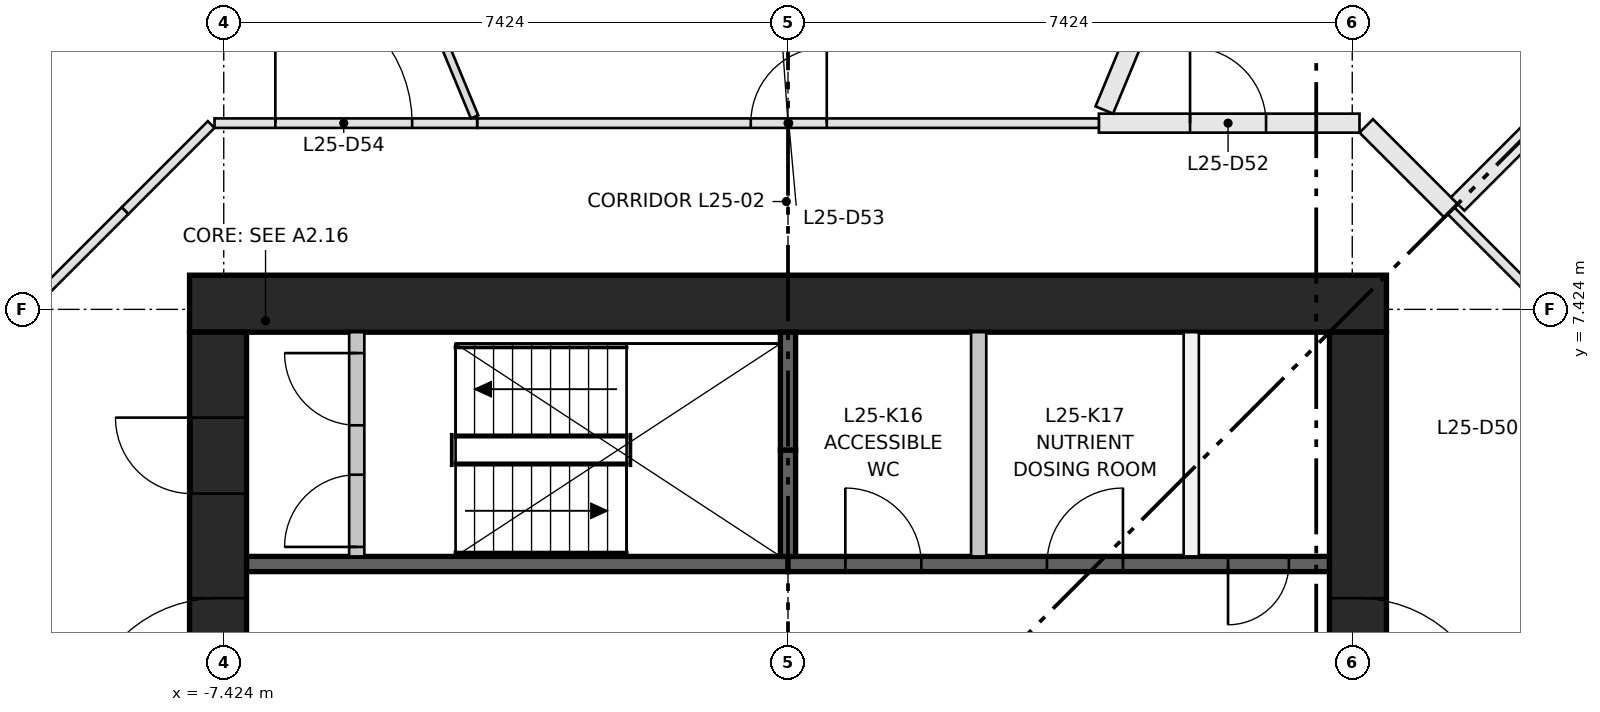
"""IFC4 building model, lengths in metres.
Left out: names, types, materials, properties, quantities, classifications, styles, units other than length and angle.
Written with IfcOpenShell. Run it as: python <this file> out.ifc"""

import sys

from ifc_helpers import new_model, si_unit, direction, frame, frame_2d, origin, place, context, subcontext, project, spatial, rectangle, extrude, element, fill, save


model = new_model("IFC4")
c1 = context("Model", 3, precision=1e-05, world=origin(), true_north=direction((0.0, 1.0)))
c2 = subcontext(c1, "Body", "Model", "MODEL_VIEW")
j1 = project(units=[si_unit("LENGTHUNIT", "METRE"), si_unit("PLANEANGLEUNIT", "RADIAN")], contexts=[c1])
p1 = place(None, origin())
s1 = spatial("IfcSite", under=j1, at=p1, CompositionType="ELEMENT")
p2 = place(p1, origin())
s2 = spatial("IfcBuilding", under=s1, at=p2, CompositionType="ELEMENT")
p3 = place(p2, frame((0.0, 0.0, 98.3)))
s3 = spatial("IfcBuildingStorey", under=s2, at=p3, CompositionType="ELEMENT", Elevation=98.3)
p4 = place(p3, frame((-7.874, 7.499, 0.0), z_axis=(0.0, 0.0, 1.0), x_axis=(1.0, 0.0, 0.0)))
e1 = element("IfcWall", 1, at=p4, inside=s3, PredefinedType="SHEAR", context=c2, shape_type="SweptSolid", body=[
    extrude(rectangle(XDim=15.748, YDim=0.75, at=frame_2d((7.874, 0.0))), origin(), (0.0, 0.0, 1.0), 3.65),
])
p5 = place(p3, frame((-7.499, -7.124, 0.0), z_axis=(0.0, 0.0, 1.0), x_axis=(0.0, 1.0, 0.0)))
e2 = element("IfcWall", 2, at=p5, inside=s3, PredefinedType="SHEAR", context=c2, shape_type="SweptSolid", body=[
    extrude(rectangle(XDim=14.248, YDim=0.75, at=frame_2d((7.124, 0.0))), origin(), (0.0, 0.0, 1.0), 3.65),
])
p6 = place(p5, frame((6.624, 0.0, 0.0)))
e3 = element("IfcOpeningElement", 3, at=p6, cuts=e2, PredefinedType="OPENING", context=c2, shape_type="SweptSolid", body=[
    extrude(rectangle(XDim=1.0, YDim=2.1, at=frame_2d((0.5, 1.05))), frame((0.0, 0.385, 0.0), z_axis=(0.0, -1.0, 0.0), x_axis=(1.0, 0.0, 0.0)), (0.0, 0.0, 1.0), 0.77),
])
p7 = place(p5, frame((3.5, 0.0, 0.0)))
e4 = element("IfcOpeningElement", 4, at=p7, cuts=e2, PredefinedType="OPENING", context=c2, shape_type="SweptSolid", body=[
    extrude(rectangle(XDim=1.8, YDim=2.1, at=frame_2d((0.9, 1.05))), frame((0.0, 0.385, 0.0), z_axis=(0.0, -1.0, 0.0), x_axis=(1.0, 0.0, 0.0)), (0.0, 0.0, 1.0), 0.77),
])
p8 = place(p5, frame((8.948, 0.0, 0.0)))
e5 = element("IfcOpeningElement", 5, at=p8, cuts=e2, PredefinedType="OPENING", context=c2, shape_type="SweptSolid", body=[
    extrude(rectangle(XDim=1.8, YDim=2.1, at=frame_2d((0.9, 1.05))), frame((0.0, 0.385, 0.0), z_axis=(0.0, -1.0, 0.0), x_axis=(1.0, 0.0, 0.0)), (0.0, 0.0, 1.0), 0.77),
])
p9 = place(p5, frame((12.124, 0.0, 0.0)))
e6 = element("IfcOpeningElement", 6, at=p9, cuts=e2, PredefinedType="OPENING", context=c2, shape_type="SweptSolid", body=[
    extrude(rectangle(XDim=1.0, YDim=2.1, at=frame_2d((0.5, 1.05))), frame((0.0, 0.385, 0.0), z_axis=(0.0, -1.0, 0.0), x_axis=(1.0, 0.0, 0.0)), (0.0, 0.0, 1.0), 0.77),
])
p10 = place(p3, frame((7.499, -7.124, 0.0), z_axis=(0.0, 0.0, 1.0), x_axis=(0.0, 1.0, 0.0)))
e7 = element("IfcWall", 7, at=p10, inside=s3, PredefinedType="SHEAR", context=c2, shape_type="SweptSolid", body=[
    extrude(rectangle(XDim=14.248, YDim=0.75, at=frame_2d((7.124, 0.0))), origin(), (0.0, 0.0, 1.0), 3.65),
])
p11 = place(p10, frame((6.624, 0.0, 0.0)))
e8 = element("IfcOpeningElement", 8, at=p11, cuts=e7, PredefinedType="OPENING", context=c2, shape_type="SweptSolid", body=[
    extrude(rectangle(XDim=1.0, YDim=2.1, at=frame_2d((0.5, 1.05))), frame((0.0, 0.385, 0.0), z_axis=(0.0, -1.0, 0.0), x_axis=(1.0, 0.0, 0.0)), (0.0, 0.0, 1.0), 0.77),
])
p12 = place(p10, frame((3.5, 0.0, 0.0)))
e9 = element("IfcOpeningElement", 9, at=p12, cuts=e7, PredefinedType="OPENING", context=c2, shape_type="SweptSolid", body=[
    extrude(rectangle(XDim=1.8, YDim=2.1, at=frame_2d((0.9, 1.05))), frame((0.0, 0.385, 0.0), z_axis=(0.0, -1.0, 0.0), x_axis=(1.0, 0.0, 0.0)), (0.0, 0.0, 1.0), 0.77),
])
p13 = place(p10, frame((8.948, 0.0, 0.0)))
e10 = element("IfcOpeningElement", 10, at=p13, cuts=e7, PredefinedType="OPENING", context=c2, shape_type="SweptSolid", body=[
    extrude(rectangle(XDim=1.8, YDim=2.1, at=frame_2d((0.9, 1.05))), frame((0.0, 0.385, 0.0), z_axis=(0.0, -1.0, 0.0), x_axis=(1.0, 0.0, 0.0)), (0.0, 0.0, 1.0), 0.77),
])
p14 = place(p3, frame((-7.124, 4.074, 0.0), z_axis=(0.0, 0.0, 1.0), x_axis=(1.0, 0.0, 0.0)))
e11 = element("IfcWall", 11, at=p14, inside=s3, PredefinedType="SHEAR", context=c2, shape_type="SweptSolid", body=[
    extrude(rectangle(XDim=7.124, YDim=0.2, at=frame_2d((3.562, 0.0))), origin(), (0.0, 0.0, 1.0), 3.3),
])
p15 = place(p3, frame((0.0, 4.074, 0.0), z_axis=(0.0, 0.0, 1.0), x_axis=(1.0, 0.0, 0.0)))
e12 = element("IfcWall", 12, at=p15, inside=s3, PredefinedType="SHEAR", context=c2, shape_type="SweptSolid", body=[
    extrude(rectangle(XDim=7.124, YDim=0.2, at=frame_2d((3.562, 0.0))), origin(), (0.0, 0.0, 1.0), 3.3),
])
p16 = place(p15, frame((0.754, 0.0, 0.0)))
e13 = element("IfcOpeningElement", 13, at=p16, cuts=e12, PredefinedType="OPENING", context=c2, shape_type="SweptSolid", body=[
    extrude(rectangle(XDim=1.0, YDim=2.1, at=frame_2d((0.5, 1.05))), frame((0.0, 0.11, 0.0), z_axis=(0.0, -1.0, 0.0), x_axis=(1.0, 0.0, 0.0)), (0.0, 0.0, 1.0), 0.22),
])
p17 = place(p15, frame((3.407, 0.0, 0.0)))
e14 = element("IfcOpeningElement", 14, at=p17, cuts=e12, PredefinedType="OPENING", context=c2, shape_type="SweptSolid", body=[
    extrude(rectangle(XDim=1.0, YDim=2.1, at=frame_2d((0.5, 1.05))), frame((0.0, 0.11, 0.0), z_axis=(0.0, -1.0, 0.0), x_axis=(1.0, 0.0, 0.0)), (0.0, 0.0, 1.0), 0.22),
])
p18 = place(p15, frame((5.79, 0.0, 0.0)))
e15 = element("IfcOpeningElement", 15, at=p18, cuts=e12, PredefinedType="OPENING", context=c2, shape_type="SweptSolid", body=[
    extrude(rectangle(XDim=0.8, YDim=2.1, at=frame_2d((0.4, 1.05))), frame((0.0, 0.11, 0.0), z_axis=(0.0, -1.0, 0.0), x_axis=(1.0, 0.0, 0.0)), (0.0, 0.0, 1.0), 0.22),
])
p19 = place(p3, frame((0.0, 4.174, 0.0), z_axis=(0.0, 0.0, 1.0), x_axis=(0.0, 1.0, 0.0)))
e16 = element("IfcWall", 16, at=p19, inside=s3, PredefinedType="SHEAR", context=c2, shape_type="SweptSolid", body=[
    extrude(rectangle(XDim=1.4, YDim=0.2, at=frame_2d((0.7, 0.0))), origin(), (0.0, 0.0, 1.0), 3.3),
])
p20 = place(p3, frame((0.0, 5.574, 0.0), z_axis=(0.0, 0.0, 1.0), x_axis=(0.0, 1.0, 0.0)))
e17 = element("IfcWall", 17, at=p20, inside=s3, PredefinedType="SHEAR", context=c2, shape_type="SweptSolid", body=[
    extrude(rectangle(XDim=1.55, YDim=0.2, at=frame_2d((0.775, 0.0))), origin(), (0.0, 0.0, 1.0), 3.3),
])
for number, where, z_axis, x_axis in (
    (18, (2.509, 4.174, 0.0), (0.0, 0.0, 1.0), (0.0, 1.0, 0.0)),
    (19, (5.305, 4.174, 0.0), (0.0, 0.0, 1.0), (0.0, 1.0, 0.0)),
):
    element("IfcWall", number, at=place(p3, frame(where, z_axis=z_axis, x_axis=x_axis)), inside=s3, PredefinedType="PARTITIONING", context=c2, shape_type="SweptSolid", body=[
        extrude(rectangle(XDim=2.95, YDim=0.2, at=frame_2d((1.475, 0.0))), origin(), (0.0, 0.0, 1.0), 3.3),
    ])
p21 = place(p3, frame((-5.674, 4.174, 0.0), z_axis=(0.0, 0.0, 1.0), x_axis=(0.0, 1.0, 0.0)))
e20 = element("IfcWall", 20, at=p21, inside=s3, PredefinedType="PARTITIONING", context=c2, shape_type="SweptSolid", body=[
    extrude(rectangle(XDim=2.95, YDim=0.2, at=frame_2d((1.475, 0.0))), origin(), (0.0, 0.0, 1.0), 3.3),
])
p22 = place(p21, frame((0.125, 0.0, 0.0)))
e21 = element("IfcOpeningElement", 21, at=p22, cuts=e20, PredefinedType="OPENING", context=c2, shape_type="SweptSolid", body=[
    extrude(rectangle(XDim=0.95, YDim=2.1, at=frame_2d((0.475, 1.05))), frame((0.0, 0.11, 0.0), z_axis=(0.0, -1.0, 0.0), x_axis=(1.0, 0.0, 0.0)), (0.0, 0.0, 1.0), 0.22),
])
p23 = place(p21, frame((1.725, 0.0, 0.0)))
e22 = element("IfcOpeningElement", 22, at=p23, cuts=e20, PredefinedType="OPENING", context=c2, shape_type="SweptSolid", body=[
    extrude(rectangle(XDim=0.95, YDim=2.1, at=frame_2d((0.475, 1.05))), frame((0.0, 0.11, 0.0), z_axis=(0.0, -1.0, 0.0), x_axis=(1.0, 0.0, 0.0)), (0.0, 0.0, 1.0), 0.22),
])
p24 = place(p3, frame((8.722, 8.722, 0.0), z_axis=(0.0, 0.0, 1.0), x_axis=(0.70718294931, -0.707030604857, 0.0)))
e23 = element("IfcWall", 23, at=p24, inside=s3, PredefinedType="PARTITIONING", context=c2, shape_type="SweptSolid", body=[
    extrude(rectangle(XDim=1.603, YDim=0.125, at=frame_2d((0.801, 0.0))), origin(), (0.0, 0.0, 1.0), 3.3),
])
p25 = place(p3, frame((4.09, 9.874, 0.0), z_axis=(0.0, 0.0, 1.0), x_axis=(1.0, 0.0, 0.0)))
e24 = element("IfcWall", 24, at=p25, inside=s3, PredefinedType="PARTITIONING", context=c2, shape_type="SweptSolid", body=[
    extrude(rectangle(XDim=3.429, YDim=0.25, at=frame_2d((1.715, 0.0))), origin(), (0.0, 0.0, 1.0), 3.3),
])
p26 = place(p25, frame((1.2, 0.0, 0.0)))
e25 = element("IfcOpeningElement", 25, at=p26, cuts=e24, PredefinedType="OPENING", context=c2, shape_type="SweptSolid", body=[
    extrude(rectangle(XDim=1.0, YDim=2.1, at=frame_2d((0.5, 1.05))), frame((0.0, 0.135, 0.0), z_axis=(0.0, -1.0, 0.0), x_axis=(1.0, 0.0, 0.0)), (0.0, 0.0, 1.0), 0.27),
])
p27 = place(p3, frame((7.608, 9.837, 0.0), z_axis=(0.0, 0.0, 1.0), x_axis=(0.707029353672, -0.707184200224, 0.0)))
e26 = element("IfcWall", 26, at=p27, inside=s3, PredefinedType="PARTITIONING", context=c2, shape_type="SweptSolid", body=[
    extrude(rectangle(XDim=1.577, YDim=0.25, at=frame_2d((0.788, 0.0))), origin(), (0.0, 0.0, 1.0), 3.3),
])
p28 = place(p3, frame((-4.09, 9.874, 0.0), z_axis=(0.0, 0.0, 1.0), x_axis=(1.0, 0.0, 0.0)))
e27 = element("IfcWall", 27, at=p28, inside=s3, PredefinedType="PARTITIONING", context=c2, shape_type="SweptSolid", body=[
    extrude(rectangle(XDim=8.18, YDim=0.125, at=frame_2d((4.09, 0.0))), origin(), (0.0, 0.0, 1.0), 3.3),
])
p29 = place(p28, frame((3.6, 0.0, 0.0)))
e28 = element("IfcOpeningElement", 28, at=p29, cuts=e27, PredefinedType="OPENING", context=c2, shape_type="SweptSolid", body=[
    extrude(rectangle(XDim=1.0, YDim=2.1, at=frame_2d((0.5, 1.05))), frame((0.0, 0.073, 0.0), z_axis=(0.0, -1.0, 0.0), x_axis=(1.0, 0.0, 0.0)), (0.0, 0.0, 1.0), 0.145),
])
p30 = place(p3, frame((-8.722, 8.722, 0.0), z_axis=(0.0, 0.0, 1.0), x_axis=(0.707030604857, 0.70718294931, 0.0)))
e29 = element("IfcWall", 29, at=p30, inside=s3, PredefinedType="PARTITIONING", context=c2, shape_type="SweptSolid", body=[
    extrude(rectangle(XDim=1.603, YDim=0.125, at=frame_2d((0.801, 0.0))), origin(), (0.0, 0.0, 1.0), 3.3),
])
p31 = place(p3, frame((-7.545, 9.874, 0.0), z_axis=(0.0, 0.0, 1.0), x_axis=(1.0, 0.0, 0.0)))
e30 = element("IfcWall", 30, at=p31, inside=s3, PredefinedType="PARTITIONING", context=c2, shape_type="SweptSolid", body=[
    extrude(rectangle(XDim=3.455, YDim=0.125, at=frame_2d((1.728, 0.0))), origin(), (0.0, 0.0, 1.0), 3.3),
])
p32 = place(p31, frame((0.8, 0.0, 0.0)))
e31 = element("IfcOpeningElement", 31, at=p32, cuts=e30, PredefinedType="OPENING", context=c2, shape_type="SweptSolid", body=[
    extrude(rectangle(XDim=1.8, YDim=2.1, at=frame_2d((0.9, 1.05))), frame((0.0, 0.073, 0.0), z_axis=(0.0, -1.0, 0.0), x_axis=(1.0, 0.0, 0.0)), (0.0, 0.0, 1.0), 0.145),
])
p33 = place(p3, frame((-9.856, 7.589, 0.0), z_axis=(0.0, 0.0, 1.0), x_axis=(0.70718294931, 0.707030604857, 0.0)))
e32 = element("IfcWall", 32, at=p33, inside=s3, PredefinedType="PARTITIONING", context=c2, shape_type="SweptSolid", body=[
    extrude(rectangle(XDim=1.603, YDim=0.125, at=frame_2d((0.801, 0.0))), origin(), (0.0, 0.0, 1.0), 3.3),
])
p34 = place(p3, frame((12.792, 12.792, 0.0), z_axis=(0.0, 0.0, 1.0), x_axis=(-0.707106781187, -0.707106781187, 0.0)))
e33 = element("IfcWall", 33, at=p34, inside=s3, PredefinedType="PARTITIONING", context=c2, shape_type="SweptSolid", body=[
    extrude(rectangle(XDim=5.63, YDim=0.25, at=frame_2d((2.815, 0.0))), origin(), (0.0, 0.0, 1.0), 3.3),
])
p35 = place(p3, frame((4.162, 10.047, 0.0), z_axis=(0.0, 0.0, 1.0), x_axis=(0.382666699469, 0.923886463326, 0.0)))
e34 = element("IfcWall", 34, at=p35, inside=s3, PredefinedType="PARTITIONING", context=c2, shape_type="SweptSolid", body=[
    extrude(rectangle(XDim=4.245, YDim=0.25, at=frame_2d((2.123, 0.0))), origin(), (0.0, 0.0, 1.0), 3.3),
])
p36 = place(p3, frame((-4.124, 9.957, 0.0), z_axis=(0.0, 0.0, 1.0), x_axis=(-0.382702629741, 0.923871580464, 0.0)))
e35 = element("IfcWall", 35, at=p36, inside=s3, PredefinedType="PARTITIONING", context=c2, shape_type="SweptSolid", body=[
    extrude(rectangle(XDim=4.343, YDim=0.105, at=frame_2d((2.171, 0.0))), origin(), (0.0, 0.0, 1.0), 3.3),
])
p37 = place(p22, origin())
e36 = element("IfcDoor", 36, at=p37, inside=s3, OperationType="SINGLE_SWING_LEFT", PredefinedType="DOOR", context=c2, shape_type="SweptSolid", body=[
    extrude(rectangle(XDim=0.95, YDim=2.1, at=frame_2d((0.475, 1.05))), frame((0.0, 0.025, 0.0), z_axis=(0.0, -1.0, 0.0), x_axis=(1.0, 0.0, 0.0)), (0.0, 0.0, 1.0), 0.05),
])
fill(e21, e36)
p38 = place(p23, origin())
e37 = element("IfcDoor", 37, at=p38, inside=s3, OperationType="SINGLE_SWING_RIGHT", PredefinedType="DOOR", context=c2, shape_type="SweptSolid", body=[
    extrude(rectangle(XDim=0.95, YDim=2.1, at=frame_2d((0.475, 1.05))), frame((0.0, 0.025, 0.0), z_axis=(0.0, -1.0, 0.0), x_axis=(1.0, 0.0, 0.0)), (0.0, 0.0, 1.0), 0.05),
])
fill(e22, e37)
p39 = place(p16, origin())
e38 = element("IfcDoor", 38, at=p39, inside=s3, OperationType="SINGLE_SWING_LEFT", PredefinedType="DOOR", context=c2, shape_type="SweptSolid", body=[
    extrude(rectangle(XDim=1.0, YDim=2.1, at=frame_2d((0.5, 1.05))), frame((0.0, 0.025, 0.0), z_axis=(0.0, -1.0, 0.0), x_axis=(1.0, 0.0, 0.0)), (0.0, 0.0, 1.0), 0.05),
])
fill(e13, e38)
p40 = place(p17, origin())
e39 = element("IfcDoor", 39, at=p40, inside=s3, OperationType="SINGLE_SWING_RIGHT", PredefinedType="DOOR", context=c2, shape_type="SweptSolid", body=[
    extrude(rectangle(XDim=1.0, YDim=2.1, at=frame_2d((0.5, 1.05))), frame((0.0, 0.025, 0.0), z_axis=(0.0, -1.0, 0.0), x_axis=(1.0, 0.0, 0.0)), (0.0, 0.0, 1.0), 0.05),
])
fill(e14, e39)
p41 = place(p18, frame((0.8, 0.0, 0.0), z_axis=(0.0, 0.0, 1.0), x_axis=(-1.0, 0.0, 0.0)))
e40 = element("IfcDoor", 40, at=p41, inside=s3, OperationType="SINGLE_SWING_LEFT", PredefinedType="DOOR", context=c2, shape_type="SweptSolid", body=[
    extrude(rectangle(XDim=0.8, YDim=2.1, at=frame_2d((0.4, 1.05))), frame((0.0, 0.025, 0.0), z_axis=(0.0, -1.0, 0.0), x_axis=(1.0, 0.0, 0.0)), (0.0, 0.0, 1.0), 0.05),
])
fill(e15, e40)
p42 = place(p8, origin())
e41 = element("IfcDoor", 41, at=p42, inside=s3, OperationType="DOUBLE_DOOR_SINGLE_SWING", PredefinedType="DOOR", context=c2, shape_type="SweptSolid", body=[
    extrude(rectangle(XDim=1.8, YDim=2.1, at=frame_2d((0.9, 1.05))), frame((0.0, 0.025, 0.0), z_axis=(0.0, -1.0, 0.0), x_axis=(1.0, 0.0, 0.0)), (0.0, 0.0, 1.0), 0.05),
])
fill(e5, e41)
p43 = place(p9, origin())
e42 = element("IfcDoor", 42, at=p43, inside=s3, OperationType="SINGLE_SWING_RIGHT", PredefinedType="DOOR", context=c2, shape_type="SweptSolid", body=[
    extrude(rectangle(XDim=1.0, YDim=2.1, at=frame_2d((0.5, 1.05))), frame((0.0, 0.375, 0.0), z_axis=(0.0, -1.0, 0.0), x_axis=(1.0, 0.0, 0.0)), (0.0, 0.0, 1.0), 0.05),
])
fill(e6, e42)
p44 = place(p13, frame((1.8, 0.0, 0.0), z_axis=(0.0, 0.0, 1.0), x_axis=(-1.0, 0.0, 0.0)))
e43 = element("IfcDoor", 43, at=p44, inside=s3, OperationType="DOUBLE_DOOR_SINGLE_SWING", PredefinedType="DOOR", context=c2, shape_type="SweptSolid", body=[
    extrude(rectangle(XDim=1.8, YDim=2.1, at=frame_2d((0.9, 1.05))), frame((0.0, 0.025, 0.0), z_axis=(0.0, -1.0, 0.0), x_axis=(1.0, 0.0, 0.0)), (0.0, 0.0, 1.0), 0.05),
])
fill(e10, e43)
p45 = place(p26, origin())
e44 = element("IfcDoor", 44, at=p45, inside=s3, OperationType="SINGLE_SWING_LEFT", PredefinedType="DOOR", context=c2, shape_type="SweptSolid", body=[
    extrude(rectangle(XDim=1.0, YDim=2.1, at=frame_2d((0.5, 1.05))), frame((0.0, 0.025, 0.0), z_axis=(0.0, -1.0, 0.0), x_axis=(1.0, 0.0, 0.0)), (0.0, 0.0, 1.0), 0.05),
])
fill(e25, e44)
p46 = place(p29, origin())
e45 = element("IfcDoor", 45, at=p46, inside=s3, OperationType="SINGLE_SWING_RIGHT", PredefinedType="DOOR", context=c2, shape_type="SweptSolid", body=[
    extrude(rectangle(XDim=1.0, YDim=2.1, at=frame_2d((0.5, 1.05))), frame((0.0, 0.025, 0.0), z_axis=(0.0, -1.0, 0.0), x_axis=(1.0, 0.0, 0.0)), (0.0, 0.0, 1.0), 0.05),
])
fill(e28, e45)
p47 = place(p32, origin())
e46 = element("IfcDoor", 46, at=p47, inside=s3, OperationType="DOUBLE_DOOR_SINGLE_SWING", PredefinedType="DOOR", context=c2, shape_type="SweptSolid", body=[
    extrude(rectangle(XDim=1.8, YDim=2.1, at=frame_2d((0.9, 1.05))), frame((0.0, 0.025, 0.0), z_axis=(0.0, -1.0, 0.0), x_axis=(1.0, 0.0, 0.0)), (0.0, 0.0, 1.0), 0.05),
])
fill(e31, e46)
save(model, sys.argv[1])
